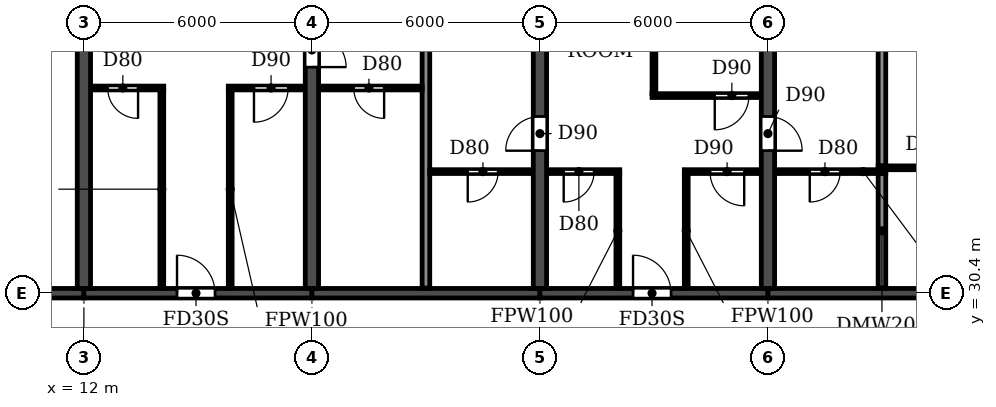
"""IFC4 building model, lengths in metres.
Left out: names, types, materials, properties, quantities, classifications, styles, units other than length and angle.
Written with IfcOpenShell. Run it as: python <this file> out.ifc"""

import sys

from ifc_helpers import new_model, si_unit, direction, frame, frame_2d, origin, place, context, subcontext, project, spatial, rectangle, extrude, element, fill, save


model = new_model("IFC4")
c1 = context("Model", 3, precision=1e-05, world=origin(), true_north=direction((0.0, 1.0)))
c2 = subcontext(c1, "Body", "Model", "MODEL_VIEW")
j1 = project(units=[si_unit("LENGTHUNIT", "METRE"), si_unit("PLANEANGLEUNIT", "RADIAN")], contexts=[c1])
p1 = place(None, origin())
s1 = spatial("IfcSite", under=j1, at=p1, CompositionType="ELEMENT")
p2 = place(p1, origin())
s2 = spatial("IfcBuilding", under=s1, at=p2, CompositionType="ELEMENT")
p3 = place(p2, frame((0.0, 0.0, 102.6)))
s3 = spatial("IfcBuildingStorey", under=s2, at=p3, CompositionType="ELEMENT", Elevation=102.6)
p4 = place(p3, frame((12.0, 30.525, 0.0), z_axis=(0.0, 0.0, 1.0), x_axis=(0.0, 1.0, 0.0)))
e1 = element("IfcWall", 1, at=p4, inside=s3, PredefinedType="SHEAR", context=c2, shape_type="SweptSolid", body=[
    extrude(rectangle(XDim=12.875, YDim=0.35, at=frame_2d((6.438, 0.0))), origin(), (0.0, 0.0, 1.0), 3.0),
])
p5 = place(p3, frame((18.0, 30.525, 0.0), z_axis=(0.0, 0.0, 1.0), x_axis=(0.0, 1.0, 0.0)))
e2 = element("IfcWall", 2, at=p5, inside=s3, PredefinedType="SHEAR", context=c2, shape_type="SweptSolid", body=[
    extrude(rectangle(XDim=12.875, YDim=0.35, at=frame_2d((6.438, 0.0))), origin(), (0.0, 0.0, 1.0), 3.0),
])
p6 = place(p5, frame((5.825, 0.0, 0.0)))
e3 = element("IfcOpeningElement", 3, at=p6, cuts=e2, PredefinedType="OPENING", context=c2, shape_type="SweptSolid", body=[
    extrude(rectangle(XDim=0.9, YDim=2.1, at=frame_2d((0.45, 1.05))), frame((0.0, 0.185, 0.0), z_axis=(0.0, -1.0, 0.0), x_axis=(1.0, 0.0, 0.0)), (0.0, 0.0, 1.0), 0.37),
])
p7 = place(p3, frame((24.0, 30.525, 0.0), z_axis=(0.0, 0.0, 1.0), x_axis=(0.0, 1.0, 0.0)))
e4 = element("IfcWall", 4, at=p7, inside=s3, PredefinedType="SHEAR", context=c2, shape_type="SweptSolid", body=[
    extrude(rectangle(XDim=12.875, YDim=0.35, at=frame_2d((6.438, 0.0))), origin(), (0.0, 0.0, 1.0), 3.0),
])
p8 = place(p7, frame((3.625, 0.0, 0.0)))
e5 = element("IfcOpeningElement", 5, at=p8, cuts=e4, PredefinedType="OPENING", context=c2, shape_type="SweptSolid", body=[
    extrude(rectangle(XDim=0.9, YDim=2.1, at=frame_2d((0.45, 1.05))), frame((0.0, 0.185, 0.0), z_axis=(0.0, -1.0, 0.0), x_axis=(1.0, 0.0, 0.0)), (0.0, 0.0, 1.0), 0.37),
])
p9 = place(p3, frame((30.0, 30.525, 0.0), z_axis=(0.0, 0.0, 1.0), x_axis=(0.0, 1.0, 0.0)))
e6 = element("IfcWall", 6, at=p9, inside=s3, PredefinedType="SHEAR", context=c2, shape_type="SweptSolid", body=[
    extrude(rectangle(XDim=12.875, YDim=0.35, at=frame_2d((6.438, 0.0))), origin(), (0.0, 0.0, 1.0), 3.0),
])
p10 = place(p9, frame((3.625, 0.0, 0.0)))
e7 = element("IfcOpeningElement", 7, at=p10, cuts=e6, PredefinedType="OPENING", context=c2, shape_type="SweptSolid", body=[
    extrude(rectangle(XDim=0.9, YDim=2.1, at=frame_2d((0.45, 1.05))), frame((0.0, 0.185, 0.0), z_axis=(0.0, -1.0, 0.0), x_axis=(1.0, 0.0, 0.0)), (0.0, 0.0, 1.0), 0.37),
])
p11 = place(p3, frame((6.2, 30.4, 0.0), z_axis=(0.0, 0.0, 1.0), x_axis=(1.0, 0.0, 0.0)))
e8 = element("IfcWall", 8, at=p11, inside=s3, PredefinedType="SHEAR", context=c2, shape_type="SweptSolid", body=[
    extrude(rectangle(XDim=5.8, YDim=0.25, at=frame_2d((2.9, 0.0))), origin(), (0.0, 0.0, 1.0), 2.4),
])
p12 = place(p11, frame((2.3, 0.0, 0.0)))
e9 = element("IfcOpeningElement", 9, at=p12, cuts=e8, PredefinedType="OPENING", context=c2, shape_type="SweptSolid", body=[
    extrude(rectangle(XDim=1.0, YDim=2.1, at=frame_2d((0.5, 1.05))), frame((0.0, 0.135, 0.0), z_axis=(0.0, -1.0, 0.0), x_axis=(1.0, 0.0, 0.0)), (0.0, 0.0, 1.0), 0.27),
])
p13 = place(p3, frame((12.0, 30.4, 0.0), z_axis=(0.0, 0.0, 1.0), x_axis=(1.0, 0.0, 0.0)))
e10 = element("IfcWall", 10, at=p13, inside=s3, PredefinedType="SHEAR", context=c2, shape_type="SweptSolid", body=[
    extrude(rectangle(XDim=6.0, YDim=0.25, at=frame_2d((3.0, 0.0))), origin(), (0.0, 0.0, 1.0), 2.4),
])
p14 = place(p13, frame((2.45, 0.0, 0.0)))
e11 = element("IfcOpeningElement", 11, at=p14, cuts=e10, PredefinedType="OPENING", context=c2, shape_type="SweptSolid", body=[
    extrude(rectangle(XDim=1.0, YDim=2.1, at=frame_2d((0.5, 1.05))), frame((0.0, 0.135, 0.0), z_axis=(0.0, -1.0, 0.0), x_axis=(1.0, 0.0, 0.0)), (0.0, 0.0, 1.0), 0.27),
])
p15 = place(p3, frame((18.0, 30.4, 0.0), z_axis=(0.0, 0.0, 1.0), x_axis=(1.0, 0.0, 0.0)))
e12 = element("IfcWall", 12, at=p15, inside=s3, PredefinedType="SHEAR", context=c2, shape_type="SweptSolid", body=[
    extrude(rectangle(XDim=6.0, YDim=0.25, at=frame_2d((3.0, 0.0))), origin(), (0.0, 0.0, 1.0), 2.4),
])
p16 = place(p3, frame((24.0, 30.4, 0.0), z_axis=(0.0, 0.0, 1.0), x_axis=(1.0, 0.0, 0.0)))
e13 = element("IfcWall", 13, at=p16, inside=s3, PredefinedType="SHEAR", context=c2, shape_type="SweptSolid", body=[
    extrude(rectangle(XDim=6.0, YDim=0.25, at=frame_2d((3.0, 0.0))), origin(), (0.0, 0.0, 1.0), 2.4),
])
p17 = place(p16, frame((2.45, 0.0, 0.0)))
e14 = element("IfcOpeningElement", 14, at=p17, cuts=e13, PredefinedType="OPENING", context=c2, shape_type="SweptSolid", body=[
    extrude(rectangle(XDim=1.0, YDim=2.1, at=frame_2d((0.5, 1.05))), frame((0.0, 0.135, 0.0), z_axis=(0.0, -1.0, 0.0), x_axis=(1.0, 0.0, 0.0)), (0.0, 0.0, 1.0), 0.27),
])
p18 = place(p3, frame((30.0, 30.4, 0.0), z_axis=(0.0, 0.0, 1.0), x_axis=(1.0, 0.0, 0.0)))
e15 = element("IfcWall", 15, at=p18, inside=s3, PredefinedType="SHEAR", context=c2, shape_type="SweptSolid", body=[
    extrude(rectangle(XDim=6.0, YDim=0.25, at=frame_2d((3.0, 0.0))), origin(), (0.0, 0.0, 1.0), 2.4),
])
p19 = place(p3, frame((21.0, 30.535, 0.0), z_axis=(0.0, 0.0, 1.0), x_axis=(0.0, 1.0, 0.0)))
e16 = element("IfcWall", 16, at=p19, inside=s3, PredefinedType="PARTITIONING", context=c2, shape_type="SweptSolid", body=[
    extrude(rectangle(XDim=13.005, YDim=0.2, at=frame_2d((6.502, 0.0))), origin(), (0.0, 0.0, 1.0), 3.0),
])
p20 = place(p3, frame((33.0, 30.535, 0.0), z_axis=(0.0, 0.0, 1.0), x_axis=(0.0, 1.0, 0.0)))
e17 = element("IfcWall", 17, at=p20, inside=s3, PredefinedType="PARTITIONING", context=c2, shape_type="SweptSolid", body=[
    extrude(rectangle(XDim=3.015, YDim=0.2, at=frame_2d((1.508, 0.0))), origin(), (0.0, 0.0, 1.0), 3.0),
])
p21 = place(p3, frame((33.0, 33.75, 0.0), z_axis=(0.0, 0.0, 1.0), x_axis=(0.0, 1.0, 0.0)))
e18 = element("IfcWall", 18, at=p21, inside=s3, PredefinedType="PARTITIONING", context=c2, shape_type="SweptSolid", body=[
    extrude(rectangle(XDim=9.79, YDim=0.2, at=frame_2d((4.895, 0.0))), origin(), (0.0, 0.0, 1.0), 3.0),
])
p22 = place(p3, frame((21.1, 33.6, 0.0), z_axis=(0.0, 0.0, 1.0), x_axis=(1.0, 0.0, 0.0)))
e19 = element("IfcWall", 19, at=p22, inside=s3, PredefinedType="PARTITIONING", context=c2, shape_type="SweptSolid", body=[
    extrude(rectangle(XDim=2.715, YDim=0.1, at=frame_2d((1.357, 0.0))), origin(), (0.0, 0.0, 1.0), 3.0),
])
p23 = place(p22, frame((1.0, 0.0, 0.0)))
e20 = element("IfcOpeningElement", 20, at=p23, cuts=e19, PredefinedType="OPENING", context=c2, shape_type="SweptSolid", body=[
    extrude(rectangle(XDim=0.8, YDim=2.1, at=frame_2d((0.4, 1.05))), frame((0.0, 0.06, 0.0), z_axis=(0.0, -1.0, 0.0), x_axis=(1.0, 0.0, 0.0)), (0.0, 0.0, 1.0), 0.12),
])
p24 = place(p3, frame((24.185, 33.6, 0.0), z_axis=(0.0, 0.0, 1.0), x_axis=(1.0, 0.0, 0.0)))
e21 = element("IfcWall", 21, at=p24, inside=s3, PredefinedType="PARTITIONING", context=c2, shape_type="SweptSolid", body=[
    extrude(rectangle(XDim=1.915, YDim=0.1, at=frame_2d((0.958, 0.0))), origin(), (0.0, 0.0, 1.0), 3.0),
])
p25 = place(p24, frame((0.44, 0.0, 0.0)))
e22 = element("IfcOpeningElement", 22, at=p25, cuts=e21, PredefinedType="OPENING", context=c2, shape_type="SweptSolid", body=[
    extrude(rectangle(XDim=0.8, YDim=2.1, at=frame_2d((0.4, 1.05))), frame((0.0, 0.06, 0.0), z_axis=(0.0, -1.0, 0.0), x_axis=(1.0, 0.0, 0.0)), (0.0, 0.0, 1.0), 0.12),
])
p26 = place(p3, frame((27.8, 33.6, 0.0), z_axis=(0.0, 0.0, 1.0), x_axis=(1.0, 0.0, 0.0)))
e23 = element("IfcWall", 23, at=p26, inside=s3, PredefinedType="PARTITIONING", context=c2, shape_type="SweptSolid", body=[
    extrude(rectangle(XDim=2.015, YDim=0.1, at=frame_2d((1.007, 0.0))), origin(), (0.0, 0.0, 1.0), 3.0),
])
p27 = place(p26, frame((0.675, 0.0, 0.0)))
e24 = element("IfcOpeningElement", 24, at=p27, cuts=e23, PredefinedType="OPENING", context=c2, shape_type="SweptSolid", body=[
    extrude(rectangle(XDim=0.9, YDim=2.1, at=frame_2d((0.45, 1.05))), frame((0.0, 0.06, 0.0), z_axis=(0.0, -1.0, 0.0), x_axis=(1.0, 0.0, 0.0)), (0.0, 0.0, 1.0), 0.12),
])
p28 = place(p3, frame((30.185, 33.6, 0.0), z_axis=(0.0, 0.0, 1.0), x_axis=(1.0, 0.0, 0.0)))
e25 = element("IfcWall", 25, at=p28, inside=s3, PredefinedType="PARTITIONING", context=c2, shape_type="SweptSolid", body=[
    extrude(rectangle(XDim=2.915, YDim=0.1, at=frame_2d((1.458, 0.0))), origin(), (0.0, 0.0, 1.0), 3.0),
])
p29 = place(p28, frame((0.915, 0.0, 0.0)))
e26 = element("IfcOpeningElement", 26, at=p29, cuts=e25, PredefinedType="OPENING", context=c2, shape_type="SweptSolid", body=[
    extrude(rectangle(XDim=0.8, YDim=2.1, at=frame_2d((0.4, 1.05))), frame((0.0, 0.06, 0.0), z_axis=(0.0, -1.0, 0.0), x_axis=(1.0, 0.0, 0.0)), (0.0, 0.0, 1.0), 0.12),
])
p30 = place(p3, frame((32.9, 33.7, 0.0), z_axis=(0.0, 0.0, 1.0), x_axis=(1.0, 0.0, 0.0)))
e27 = element("IfcWall", 27, at=p30, inside=s3, PredefinedType="PARTITIONING", context=c2, shape_type="SweptSolid", body=[
    extrude(rectangle(XDim=2.915, YDim=0.1, at=frame_2d((1.458, 0.0))), origin(), (0.0, 0.0, 1.0), 3.0),
])
p31 = place(p30, frame((1.2, 0.0, 0.0)))
e28 = element("IfcOpeningElement", 28, at=p31, cuts=e27, PredefinedType="OPENING", context=c2, shape_type="SweptSolid", body=[
    extrude(rectangle(XDim=0.8, YDim=2.1, at=frame_2d((0.4, 1.05))), frame((0.0, 0.06, 0.0), z_axis=(0.0, -1.0, 0.0), x_axis=(1.0, 0.0, 0.0)), (0.0, 0.0, 1.0), 0.12),
])
p32 = place(p3, frame((26.95, 35.6, 0.0), z_axis=(0.0, 0.0, 1.0), x_axis=(1.0, 0.0, 0.0)))
e29 = element("IfcWall", 29, at=p32, inside=s3, PredefinedType="PARTITIONING", context=c2, shape_type="SweptSolid", body=[
    extrude(rectangle(XDim=2.865, YDim=0.1, at=frame_2d((1.433, 0.0))), origin(), (0.0, 0.0, 1.0), 3.0),
])
p33 = place(p32, frame((1.65, 0.0, 0.0)))
e30 = element("IfcOpeningElement", 30, at=p33, cuts=e29, PredefinedType="OPENING", context=c2, shape_type="SweptSolid", body=[
    extrude(rectangle(XDim=0.9, YDim=2.1, at=frame_2d((0.45, 1.05))), frame((0.0, 0.06, 0.0), z_axis=(0.0, -1.0, 0.0), x_axis=(1.0, 0.0, 0.0)), (0.0, 0.0, 1.0), 0.12),
])
p34 = place(p3, frame((12.185, 35.8, 0.0), z_axis=(0.0, 0.0, 1.0), x_axis=(1.0, 0.0, 0.0)))
e31 = element("IfcWall", 31, at=p34, inside=s3, PredefinedType="PARTITIONING", context=c2, shape_type="SweptSolid", body=[
    extrude(rectangle(XDim=1.915, YDim=0.1, at=frame_2d((0.958, 0.0))), origin(), (0.0, 0.0, 1.0), 3.0),
])
p35 = place(p34, frame((0.44, 0.0, 0.0)))
e32 = element("IfcOpeningElement", 32, at=p35, cuts=e31, PredefinedType="OPENING", context=c2, shape_type="SweptSolid", body=[
    extrude(rectangle(XDim=0.8, YDim=2.1, at=frame_2d((0.4, 1.05))), frame((0.0, 0.06, 0.0), z_axis=(0.0, -1.0, 0.0), x_axis=(1.0, 0.0, 0.0)), (0.0, 0.0, 1.0), 0.12),
])
p36 = place(p3, frame((15.8, 35.8, 0.0), z_axis=(0.0, 0.0, 1.0), x_axis=(1.0, 0.0, 0.0)))
e33 = element("IfcWall", 33, at=p36, inside=s3, PredefinedType="PARTITIONING", context=c2, shape_type="SweptSolid", body=[
    extrude(rectangle(XDim=2.015, YDim=0.1, at=frame_2d((1.007, 0.0))), origin(), (0.0, 0.0, 1.0), 3.0),
])
p37 = place(p36, frame((0.675, 0.0, 0.0)))
e34 = element("IfcOpeningElement", 34, at=p37, cuts=e33, PredefinedType="OPENING", context=c2, shape_type="SweptSolid", body=[
    extrude(rectangle(XDim=0.9, YDim=2.1, at=frame_2d((0.45, 1.05))), frame((0.0, 0.06, 0.0), z_axis=(0.0, -1.0, 0.0), x_axis=(1.0, 0.0, 0.0)), (0.0, 0.0, 1.0), 0.12),
])
p38 = place(p3, frame((18.185, 35.8, 0.0), z_axis=(0.0, 0.0, 1.0), x_axis=(1.0, 0.0, 0.0)))
e35 = element("IfcWall", 35, at=p38, inside=s3, PredefinedType="PARTITIONING", context=c2, shape_type="SweptSolid", body=[
    extrude(rectangle(XDim=2.715, YDim=0.1, at=frame_2d((1.357, 0.0))), origin(), (0.0, 0.0, 1.0), 3.0),
])
p39 = place(p38, frame((0.915, 0.0, 0.0)))
e36 = element("IfcOpeningElement", 36, at=p39, cuts=e35, PredefinedType="OPENING", context=c2, shape_type="SweptSolid", body=[
    extrude(rectangle(XDim=0.8, YDim=2.1, at=frame_2d((0.4, 1.05))), frame((0.0, 0.06, 0.0), z_axis=(0.0, -1.0, 0.0), x_axis=(1.0, 0.0, 0.0)), (0.0, 0.0, 1.0), 0.12),
])
for number, where, z_axis, x_axis in (
    (37, (14.05, 30.535, 0.0), (0.0, 0.0, 1.0), (0.0, 1.0, 0.0)),
    (38, (15.85, 30.535, 0.0), (0.0, 0.0, 1.0), (0.0, 1.0, 0.0)),
):
    element("IfcWall", number, at=place(p3, frame(where, z_axis=z_axis, x_axis=x_axis)), inside=s3, PredefinedType="PARTITIONING", context=c2, shape_type="SweptSolid", body=[
        extrude(rectangle(XDim=5.215, YDim=0.1, at=frame_2d((2.607, 0.0))), origin(), (0.0, 0.0, 1.0), 3.0),
    ])
p40 = place(p3, frame((26.05, 30.535, 0.0), z_axis=(0.0, 0.0, 1.0), x_axis=(0.0, 1.0, 0.0)))
e39 = element("IfcWall", 39, at=p40, inside=s3, PredefinedType="PARTITIONING", context=c2, shape_type="SweptSolid", body=[
    extrude(rectangle(XDim=3.015, YDim=0.1, at=frame_2d((1.508, 0.0))), origin(), (0.0, 0.0, 1.0), 3.0),
])
p41 = place(p3, frame((27.0, 35.65, 0.0), z_axis=(0.0, 0.0, 1.0), x_axis=(0.0, 1.0, 0.0)))
e40 = element("IfcWall", 40, at=p41, inside=s3, PredefinedType="PARTITIONING", context=c2, shape_type="SweptSolid", body=[
    extrude(rectangle(XDim=7.89, YDim=0.1, at=frame_2d((3.945, 0.0))), origin(), (0.0, 0.0, 1.0), 3.0),
])
p42 = place(p3, frame((27.85, 30.535, 0.0), z_axis=(0.0, 0.0, 1.0), x_axis=(0.0, 1.0, 0.0)))
e41 = element("IfcWall", 41, at=p42, inside=s3, PredefinedType="PARTITIONING", context=c2, shape_type="SweptSolid", body=[
    extrude(rectangle(XDim=3.015, YDim=0.1, at=frame_2d((1.508, 0.0))), origin(), (0.0, 0.0, 1.0), 3.0),
])
p43 = place(p39, frame((0.8, 0.0, 0.0), z_axis=(0.0, 0.0, 1.0), x_axis=(-1.0, 0.0, 0.0)))
e42 = element("IfcDoor", 42, at=p43, inside=s3, OperationType="SINGLE_SWING_LEFT", PredefinedType="DOOR", context=c2, shape_type="SweptSolid", body=[
    extrude(rectangle(XDim=0.8, YDim=2.1, at=frame_2d((0.4, 1.05))), frame((0.0, 0.025, 0.0), z_axis=(0.0, -1.0, 0.0), x_axis=(1.0, 0.0, 0.0)), (0.0, 0.0, 1.0), 0.05),
])
fill(e36, e42)
p44 = place(p35, frame((0.8, 0.0, 0.0), z_axis=(0.0, 0.0, 1.0), x_axis=(-1.0, 0.0, 0.0)))
e43 = element("IfcDoor", 43, at=p44, inside=s3, OperationType="SINGLE_SWING_LEFT", PredefinedType="DOOR", context=c2, shape_type="SweptSolid", body=[
    extrude(rectangle(XDim=0.8, YDim=2.1, at=frame_2d((0.4, 1.05))), frame((0.0, 0.025, 0.0), z_axis=(0.0, -1.0, 0.0), x_axis=(1.0, 0.0, 0.0)), (0.0, 0.0, 1.0), 0.05),
])
fill(e32, e43)
p45 = place(p14, origin())
e44 = element("IfcDoor", 44, at=p45, inside=s3, OperationType="SINGLE_SWING_LEFT", PredefinedType="DOOR", context=c2, shape_type="SweptSolid", body=[
    extrude(rectangle(XDim=1.0, YDim=2.1, at=frame_2d((0.5, 1.05))), frame((0.0, 0.025, 0.0), z_axis=(0.0, -1.0, 0.0), x_axis=(1.0, 0.0, 0.0)), (0.0, 0.0, 1.0), 0.05),
])
fill(e11, e44)
p46 = place(p37, frame((0.9, 0.0, 0.0), z_axis=(0.0, 0.0, 1.0), x_axis=(-1.0, 0.0, 0.0)))
e45 = element("IfcDoor", 45, at=p46, inside=s3, OperationType="SINGLE_SWING_RIGHT", PredefinedType="DOOR", context=c2, shape_type="SweptSolid", body=[
    extrude(rectangle(XDim=0.9, YDim=2.1, at=frame_2d((0.45, 1.05))), frame((0.0, 0.025, 0.0), z_axis=(0.0, -1.0, 0.0), x_axis=(1.0, 0.0, 0.0)), (0.0, 0.0, 1.0), 0.05),
])
fill(e34, e45)
p47 = place(p6, frame((0.9, 0.0, 0.0), z_axis=(0.0, 0.0, 1.0), x_axis=(-1.0, 0.0, 0.0)))
e46 = element("IfcDoor", 46, at=p47, inside=s3, OperationType="SINGLE_SWING_RIGHT", PredefinedType="DOOR", context=c2, shape_type="SweptSolid", body=[
    extrude(rectangle(XDim=0.9, YDim=2.1, at=frame_2d((0.45, 1.05))), frame((0.0, 0.025, 0.0), z_axis=(0.0, -1.0, 0.0), x_axis=(1.0, 0.0, 0.0)), (0.0, 0.0, 1.0), 0.05),
])
fill(e3, e46)
p48 = place(p23, frame((0.8, 0.0, 0.0), z_axis=(0.0, 0.0, 1.0), x_axis=(-1.0, 0.0, 0.0)))
e47 = element("IfcDoor", 47, at=p48, inside=s3, OperationType="SINGLE_SWING_RIGHT", PredefinedType="DOOR", context=c2, shape_type="SweptSolid", body=[
    extrude(rectangle(XDim=0.8, YDim=2.1, at=frame_2d((0.4, 1.05))), frame((0.0, 0.025, 0.0), z_axis=(0.0, -1.0, 0.0), x_axis=(1.0, 0.0, 0.0)), (0.0, 0.0, 1.0), 0.05),
])
fill(e20, e47)
p49 = place(p29, frame((0.8, 0.0, 0.0), z_axis=(0.0, 0.0, 1.0), x_axis=(-1.0, 0.0, 0.0)))
e48 = element("IfcDoor", 48, at=p49, inside=s3, OperationType="SINGLE_SWING_RIGHT", PredefinedType="DOOR", context=c2, shape_type="SweptSolid", body=[
    extrude(rectangle(XDim=0.8, YDim=2.1, at=frame_2d((0.4, 1.05))), frame((0.0, 0.025, 0.0), z_axis=(0.0, -1.0, 0.0), x_axis=(1.0, 0.0, 0.0)), (0.0, 0.0, 1.0), 0.05),
])
fill(e26, e48)
p50 = place(p8, origin())
e49 = element("IfcDoor", 49, at=p50, inside=s3, OperationType="SINGLE_SWING_LEFT", PredefinedType="DOOR", context=c2, shape_type="SweptSolid", body=[
    extrude(rectangle(XDim=0.9, YDim=2.1, at=frame_2d((0.45, 1.05))), frame((0.0, 0.025, 0.0), z_axis=(0.0, -1.0, 0.0), x_axis=(1.0, 0.0, 0.0)), (0.0, 0.0, 1.0), 0.05),
])
fill(e5, e49)
p51 = place(p25, frame((0.8, 0.0, 0.0), z_axis=(0.0, 0.0, 1.0), x_axis=(-1.0, 0.0, 0.0)))
e50 = element("IfcDoor", 50, at=p51, inside=s3, OperationType="SINGLE_SWING_RIGHT", PredefinedType="DOOR", context=c2, shape_type="SweptSolid", body=[
    extrude(rectangle(XDim=0.8, YDim=2.1, at=frame_2d((0.4, 1.05))), frame((0.0, 0.025, 0.0), z_axis=(0.0, -1.0, 0.0), x_axis=(1.0, 0.0, 0.0)), (0.0, 0.0, 1.0), 0.05),
])
fill(e22, e50)
p52 = place(p17, origin())
e51 = element("IfcDoor", 51, at=p52, inside=s3, OperationType="SINGLE_SWING_LEFT", PredefinedType="DOOR", context=c2, shape_type="SweptSolid", body=[
    extrude(rectangle(XDim=1.0, YDim=2.1, at=frame_2d((0.5, 1.05))), frame((0.0, 0.025, 0.0), z_axis=(0.0, -1.0, 0.0), x_axis=(1.0, 0.0, 0.0)), (0.0, 0.0, 1.0), 0.05),
])
fill(e14, e51)
p53 = place(p27, frame((0.9, 0.0, 0.0), z_axis=(0.0, 0.0, 1.0), x_axis=(-1.0, 0.0, 0.0)))
e52 = element("IfcDoor", 52, at=p53, inside=s3, OperationType="SINGLE_SWING_LEFT", PredefinedType="DOOR", context=c2, shape_type="SweptSolid", body=[
    extrude(rectangle(XDim=0.9, YDim=2.1, at=frame_2d((0.45, 1.05))), frame((0.0, 0.025, 0.0), z_axis=(0.0, -1.0, 0.0), x_axis=(1.0, 0.0, 0.0)), (0.0, 0.0, 1.0), 0.05),
])
fill(e24, e52)
p54 = place(p33, frame((0.9, 0.0, 0.0), z_axis=(0.0, 0.0, 1.0), x_axis=(-1.0, 0.0, 0.0)))
e53 = element("IfcDoor", 53, at=p54, inside=s3, OperationType="SINGLE_SWING_RIGHT", PredefinedType="DOOR", context=c2, shape_type="SweptSolid", body=[
    extrude(rectangle(XDim=0.9, YDim=2.1, at=frame_2d((0.45, 1.05))), frame((0.0, 0.025, 0.0), z_axis=(0.0, -1.0, 0.0), x_axis=(1.0, 0.0, 0.0)), (0.0, 0.0, 1.0), 0.05),
])
fill(e30, e53)
p55 = place(p10, frame((0.9, 0.0, 0.0), z_axis=(0.0, 0.0, 1.0), x_axis=(-1.0, 0.0, 0.0)))
e54 = element("IfcDoor", 54, at=p55, inside=s3, OperationType="SINGLE_SWING_RIGHT", PredefinedType="DOOR", context=c2, shape_type="SweptSolid", body=[
    extrude(rectangle(XDim=0.9, YDim=2.1, at=frame_2d((0.45, 1.05))), frame((0.0, 0.025, 0.0), z_axis=(0.0, -1.0, 0.0), x_axis=(1.0, 0.0, 0.0)), (0.0, 0.0, 1.0), 0.05),
])
fill(e7, e54)
save(model, sys.argv[1])
